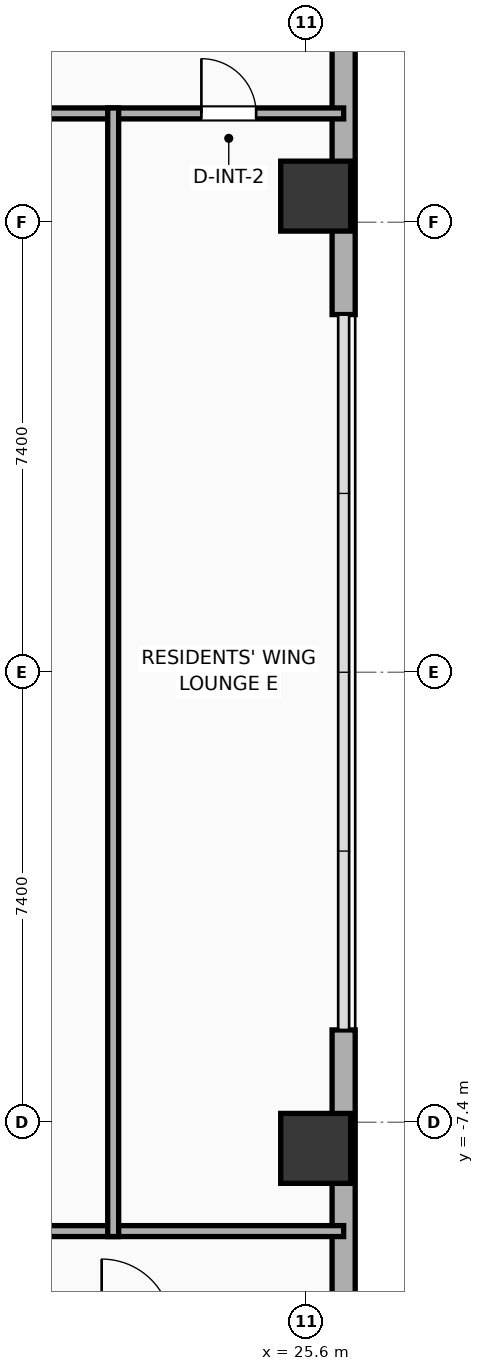
"""IFC4 building model, lengths in metres.
Left out: names, types, materials, properties, quantities, classifications, styles, units other than length and angle.
Written with IfcOpenShell. Run it as: python <this file> out.ifc"""

import sys

from ifc_helpers import new_model, si_unit, direction, frame, frame_2d, origin, origin_2d, place, context, subcontext, project, spatial, rectangle, hollow_rectangle, extrude, element, fill, save


model = new_model("IFC4")
c1 = context("Model", 3, precision=1e-05, world=origin(), true_north=direction((0.0, 1.0)))
c2 = subcontext(c1, "Body", "Model", "MODEL_VIEW")
j1 = project(units=[si_unit("LENGTHUNIT", "METRE"), si_unit("PLANEANGLEUNIT", "RADIAN")], contexts=[c1])
p1 = place(None, origin())
s1 = spatial("IfcSite", under=j1, at=p1, CompositionType="ELEMENT")
p2 = place(p1, origin())
s2 = spatial("IfcBuilding", under=s1, at=p2, CompositionType="ELEMENT")
p3 = place(p2, frame((0.0, 0.0, 61.1)))
s3 = spatial("IfcBuildingStorey", under=s2, at=p3, CompositionType="ELEMENT", Elevation=61.1)
for number, where, z_axis, x_axis in (
    (1, (25.75, -7.83, 0.0), (0.0, 0.0, 1.0), (1.0, 0.0, 0.0)),
    (2, (25.75, 7.83, 0.0), (0.0, 0.0, 1.0), (1.0, 0.0, 0.0)),
):
    element("IfcColumn", number, at=place(p3, frame(where, z_axis=z_axis, x_axis=x_axis)), inside=s3, PredefinedType="COLUMN", context=c2, shape_type="SweptSolid", body=[
        extrude(hollow_rectangle(XDim=1.15, YDim=1.15, WallThickness=0.04, at=origin_2d()), origin(), (0.0, 0.0, 1.0), 3.9),
    ])
p4 = place(p3, frame((26.21, 18.381, 0.0), z_axis=(0.0, 0.0, 1.0), x_axis=(0.0, -1.0, 0.0)))
e3 = element("IfcWall", 3, at=p4, inside=s3, PredefinedType="ELEMENTEDWALL", context=c2, shape_type="SweptSolid", body=[
    extrude(rectangle(XDim=12.499, YDim=0.38, at=frame_2d((6.25, 0.0))), origin(), (0.0, 0.0, 1.0), 3.65),
])
p5 = place(p4, frame((5.35, 0.0, 0.75)))
e4 = element("IfcOpeningElement", 4, at=p5, cuts=e3, PredefinedType="OPENING", context=c2, shape_type="SweptSolid", body=[
    extrude(rectangle(XDim=1.8, YDim=2.1, at=frame_2d((0.9, 1.05))), frame((0.0, 0.2, 0.0), z_axis=(0.0, -1.0, 0.0), x_axis=(1.0, 0.0, 0.0)), (0.0, 0.0, 1.0), 0.4),
])
p6 = place(p3, frame((26.21, -5.882, 0.0), z_axis=(0.0, 0.0, 1.0), x_axis=(0.0, -1.0, 0.0)))
e5 = element("IfcWall", 5, at=p6, inside=s3, PredefinedType="ELEMENTEDWALL", context=c2, shape_type="SweptSolid", body=[
    extrude(rectangle(XDim=12.499, YDim=0.38, at=frame_2d((6.25, 0.0))), origin(), (0.0, 0.0, 1.0), 3.65),
])
p7 = place(p6, frame((5.35, 0.0, 0.75)))
e6 = element("IfcOpeningElement", 6, at=p7, cuts=e5, PredefinedType="OPENING", context=c2, shape_type="SweptSolid", body=[
    extrude(rectangle(XDim=1.8, YDim=2.1, at=frame_2d((0.9, 1.05))), frame((0.0, 0.2, 0.0), z_axis=(0.0, -1.0, 0.0), x_axis=(1.0, 0.0, 0.0)), (0.0, 0.0, 1.0), 0.4),
])
p8 = place(p6, frame((9.274, 0.0, 0.75)))
e7 = element("IfcOpeningElement", 7, at=p8, cuts=e5, PredefinedType="OPENING", context=c2, shape_type="SweptSolid", body=[
    extrude(rectangle(XDim=1.2, YDim=2.05, at=frame_2d((0.6, 1.025))), frame((0.0, 0.2, 0.0), z_axis=(0.0, -1.0, 0.0), x_axis=(1.0, 0.0, 0.0)), (0.0, 0.0, 1.0), 0.4),
])
p9 = place(p3, frame((9.88, 9.19, 0.0), z_axis=(0.0, 0.0, 1.0), x_axis=(1.0, 0.0, 0.0)))
e8 = element("IfcWall", 8, at=p9, inside=s3, PredefinedType="PARTITIONING", context=c2, shape_type="SweptSolid", body=[
    extrude(rectangle(XDim=16.33, YDim=0.18, at=frame_2d((8.165, 0.0))), origin(), (0.0, 0.0, 1.0), 3.65),
])
p10 = place(p9, frame((13.99, 0.0, 0.0)))
e9 = element("IfcOpeningElement", 9, at=p10, cuts=e8, PredefinedType="OPENING", context=c2, shape_type="SweptSolid", body=[
    extrude(rectangle(XDim=0.9, YDim=2.05, at=frame_2d((0.45, 1.025))), frame((0.0, 0.1, 0.0), z_axis=(0.0, -1.0, 0.0), x_axis=(1.0, 0.0, 0.0)), (0.0, 0.0, 1.0), 0.2),
])
p11 = place(p3, frame((9.88, -9.19, 0.0), z_axis=(0.0, 0.0, 1.0), x_axis=(1.0, 0.0, 0.0)))
e10 = element("IfcWall", 10, at=p11, inside=s3, PredefinedType="PARTITIONING", context=c2, shape_type="SweptSolid", body=[
    extrude(rectangle(XDim=16.33, YDim=0.18, at=frame_2d((8.165, 0.0))), origin(), (0.0, 0.0, 1.0), 3.65),
])
p12 = place(p3, frame((22.42, -9.28, 0.0), z_axis=(0.0, 0.0, 1.0), x_axis=(0.0, 1.0, 0.0)))
e11 = element("IfcWall", 11, at=p12, inside=s3, PredefinedType="PARTITIONING", context=c2, shape_type="SweptSolid", body=[
    extrude(rectangle(XDim=18.56, YDim=0.18, at=frame_2d((9.28, 0.0))), origin(), (0.0, 0.0, 1.0), 3.65),
])
p13 = place(p10, origin())
e12 = element("IfcDoor", 12, at=p13, inside=s3, OperationType="SINGLE_SWING_LEFT", PredefinedType="DOOR", context=c2, shape_type="SweptSolid", body=[
    extrude(rectangle(XDim=0.9, YDim=2.05, at=frame_2d((0.45, 1.025))), frame((0.0, 0.025, 0.0), z_axis=(0.0, -1.0, 0.0), x_axis=(1.0, 0.0, 0.0)), (0.0, 0.0, 1.0), 0.05),
])
fill(e9, e12)
save(model, sys.argv[1])
